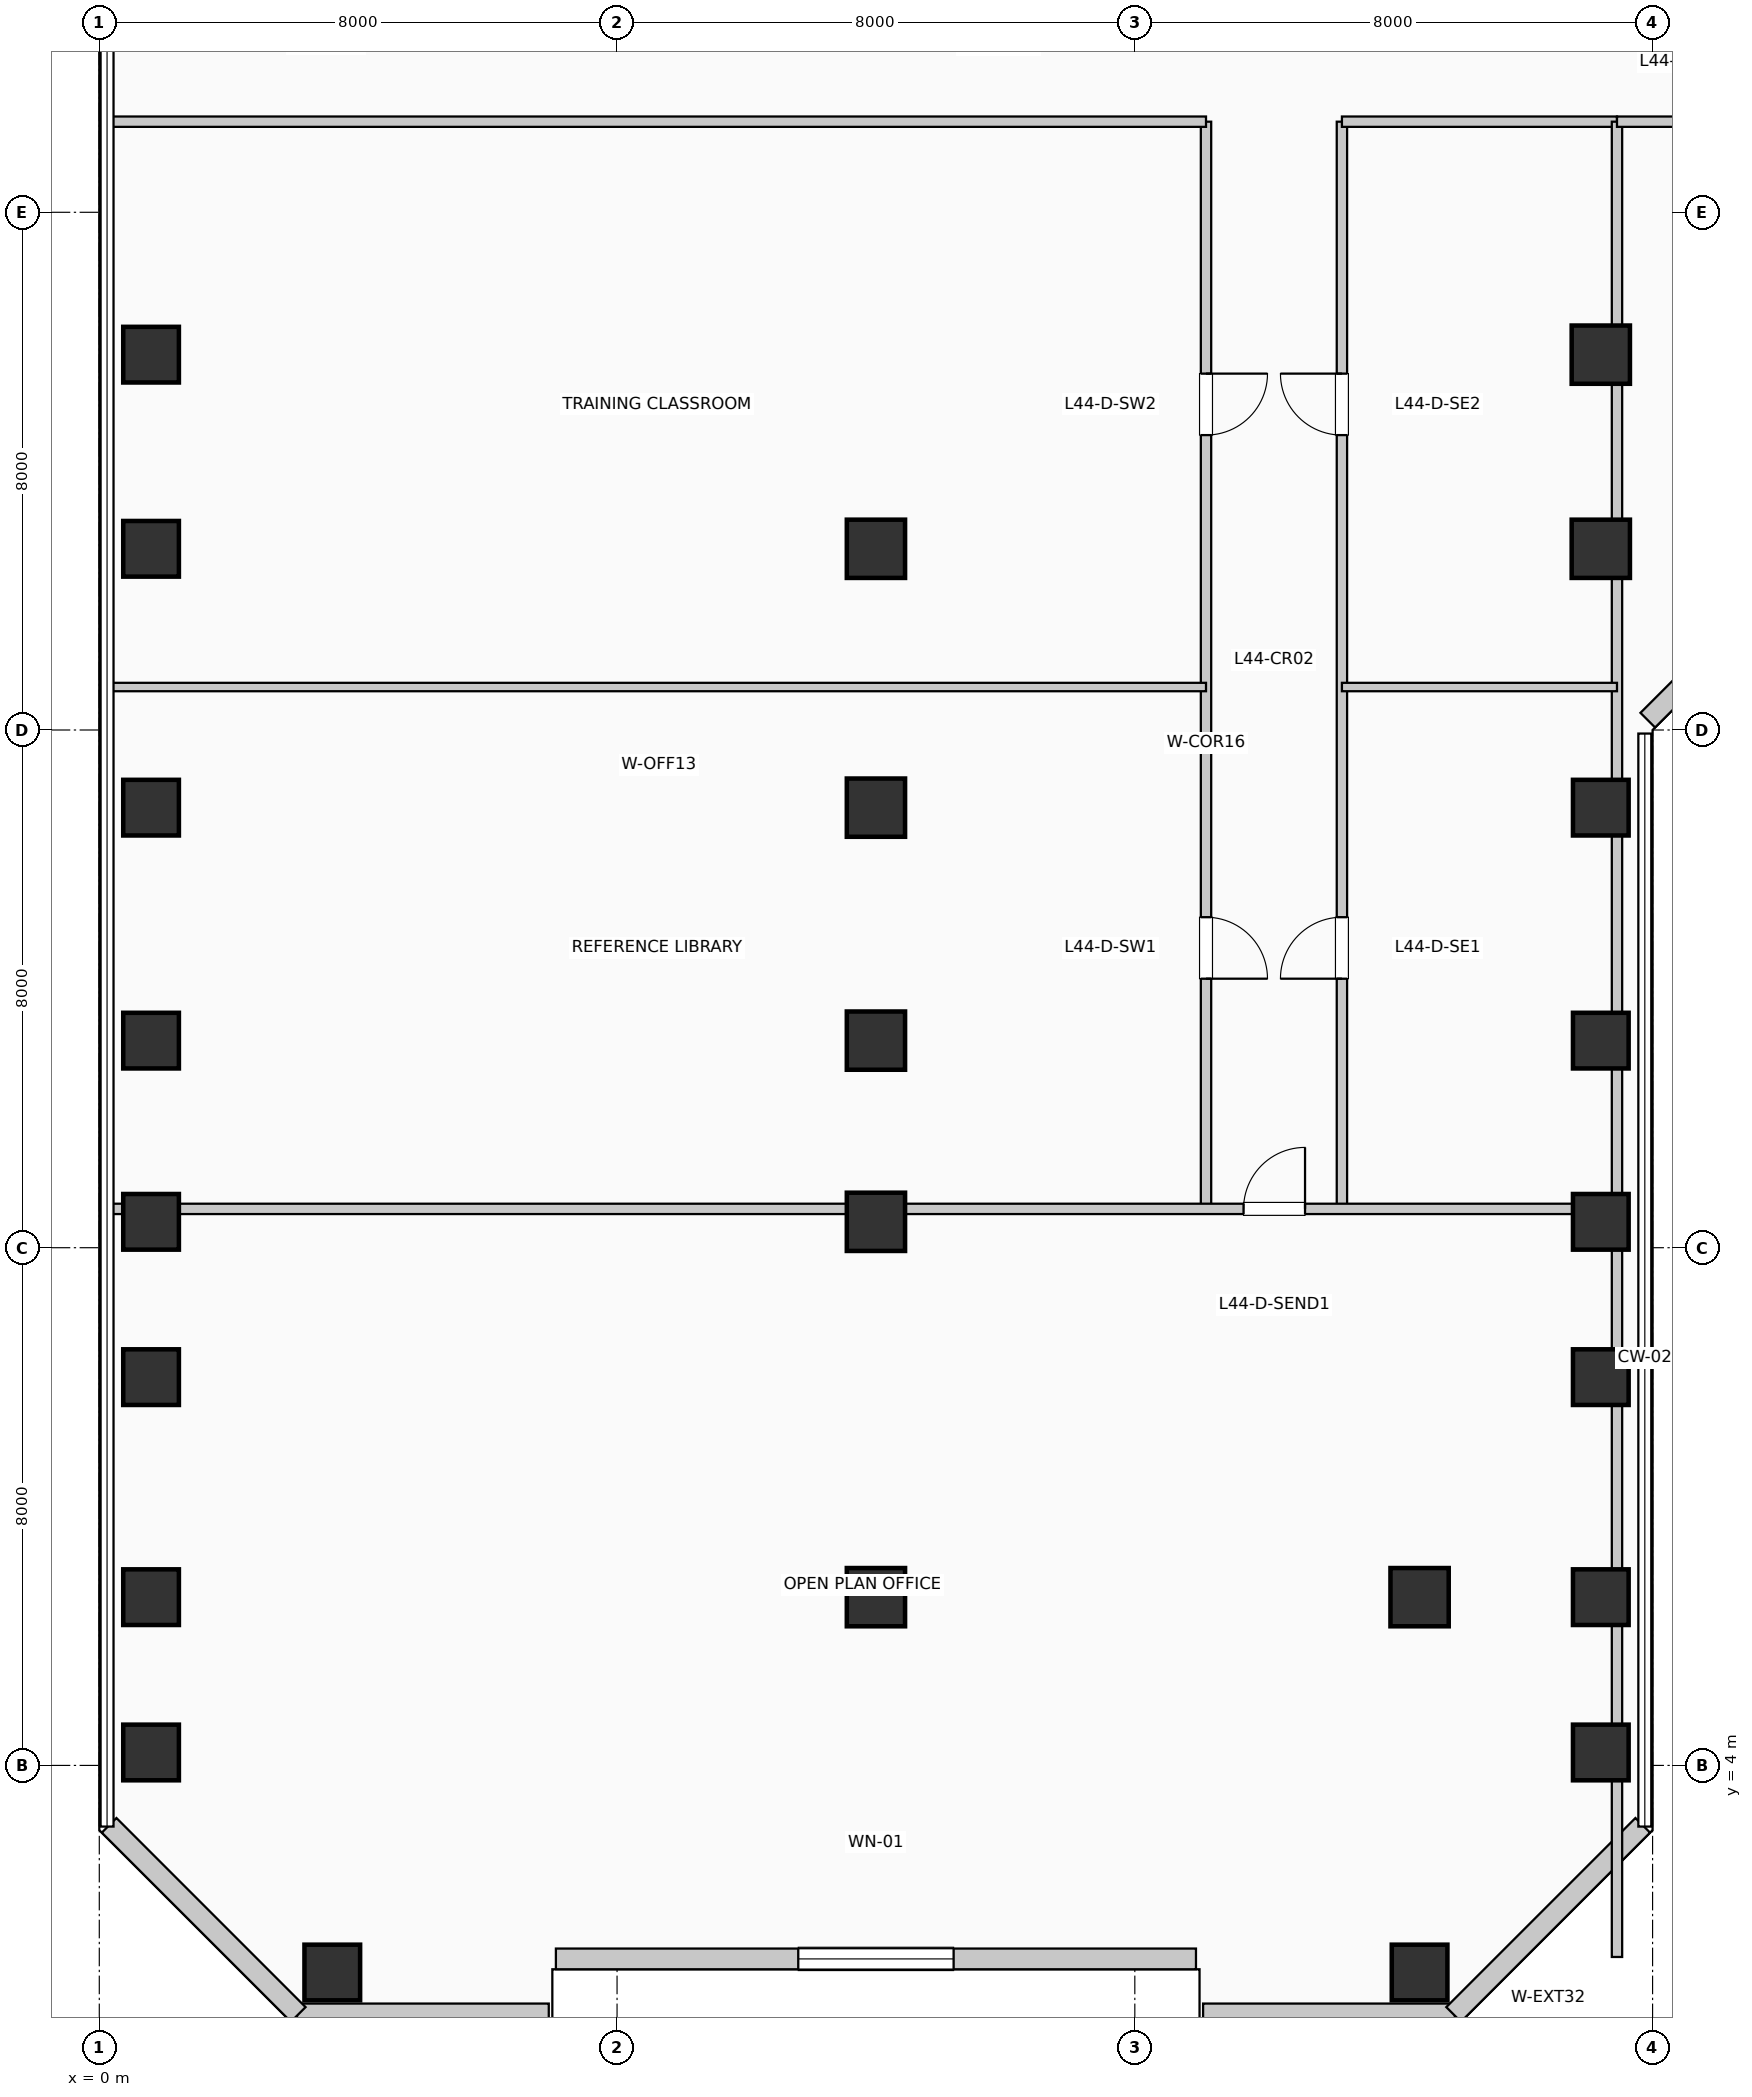
"""IFC4 building model, lengths in metres.
Left out: names, types, materials, properties, quantities, classifications, styles, units other than length and angle.
Written with IfcOpenShell. Run it as: python <this file> out.ifc"""

import sys

from ifc_helpers import new_model, si_unit, direction, frame, frame_2d, origin, origin_2d, place, context, subcontext, project, spatial, rectangle, extrude, element, fill, save


model = new_model("IFC4")
c1 = context("Model", 3, precision=1e-05, world=origin(), true_north=direction((0.0, 1.0)))
c2 = subcontext(c1, "Body", "Model", "MODEL_VIEW")
j1 = project(units=[si_unit("LENGTHUNIT", "METRE"), si_unit("PLANEANGLEUNIT", "RADIAN")], contexts=[c1])
p1 = place(None, origin())
s1 = spatial("IfcSite", under=j1, at=p1, CompositionType="ELEMENT")
p2 = place(p1, origin())
s2 = spatial("IfcBuilding", under=s1, at=p2, CompositionType="ELEMENT")
p3 = place(p2, frame((0.0, 0.0, 183.48)))
s3 = spatial("IfcBuildingStorey", under=s2, at=p3, CompositionType="ELEMENT", Elevation=183.48)
for number, where, z_axis, x_axis in (
    (1, (0.8, 4.2, 0.0), (0.0, 0.0, 1.0), (1.0, 0.0, 0.0)),
    (2, (0.8, 6.6, 0.0), (0.0, 0.0, 1.0), (1.0, 0.0, 0.0)),
    (3, (0.8, 10.0, 0.0), (0.0, 0.0, 1.0), (1.0, 0.0, 0.0)),
    (4, (0.8, 12.4, 0.0), (0.0, 0.0, 1.0), (1.0, 0.0, 0.0)),
    (5, (0.8, 15.2, 0.0), (0.0, 0.0, 1.0), (1.0, 0.0, 0.0)),
    (6, (0.8, 18.8, 0.0), (0.0, 0.0, 1.0), (1.0, 0.0, 0.0)),
    (7, (0.8, 22.8, 0.0), (0.0, 0.0, 1.0), (1.0, 0.0, 0.0)),
    (8, (0.8, 25.8, 0.0), (0.0, 0.0, 1.0), (1.0, 0.0, 0.0)),
    (9, (3.6, 0.8, 0.0), (0.0, 0.0, 1.0), (1.0, 0.0, 0.0)),
):
    element("IfcColumn", number, at=place(p3, frame(where, z_axis=z_axis, x_axis=x_axis)), inside=s3, PredefinedType="COLUMN", context=c2, shape_type="SweptSolid", body=[
        extrude(rectangle(XDim=0.86, YDim=0.86, at=origin_2d()), origin(), (0.0, 0.0, 1.0), 3.96),
    ])
for number, where, z_axis, x_axis in (
    (10, (12.0, 6.6, 0.0), (0.0, 0.0, 1.0), (1.0, 0.0, 0.0)),
    (11, (12.0, 12.4, 0.0), (0.0, 0.0, 1.0), (1.0, 0.0, 0.0)),
    (12, (12.0, 15.2, 0.0), (0.0, 0.0, 1.0), (1.0, 0.0, 0.0)),
    (13, (12.0, 18.8, 0.0), (0.0, 0.0, 1.0), (1.0, 0.0, 0.0)),
    (14, (12.0, 22.8, 0.0), (0.0, 0.0, 1.0), (1.0, 0.0, 0.0)),
):
    element("IfcColumn", number, at=place(p3, frame(where, z_axis=z_axis, x_axis=x_axis)), inside=s3, PredefinedType="COLUMN", context=c2, shape_type="SweptSolid", body=[
        extrude(rectangle(XDim=0.9, YDim=0.9, at=origin_2d()), origin(), (0.0, 0.0, 1.0), 3.96),
    ])
p4 = place(p3, frame((20.4, 0.8, 0.0), z_axis=(0.0, 0.0, 1.0), x_axis=(1.0, 0.0, 0.0)))
e15 = element("IfcColumn", 15, at=p4, inside=s3, PredefinedType="COLUMN", context=c2, shape_type="SweptSolid", body=[
    extrude(rectangle(XDim=0.86, YDim=0.86, at=origin_2d()), origin(), (0.0, 0.0, 1.0), 3.96),
])
p5 = place(p3, frame((20.4, 6.6, 0.0), z_axis=(0.0, 0.0, 1.0), x_axis=(1.0, 0.0, 0.0)))
e16 = element("IfcColumn", 16, at=p5, inside=s3, PredefinedType="COLUMN", context=c2, shape_type="SweptSolid", body=[
    extrude(rectangle(XDim=0.9, YDim=0.9, at=origin_2d()), origin(), (0.0, 0.0, 1.0), 3.96),
])
for number, where, z_axis, x_axis in (
    (17, (23.2, 4.2, 0.0), (0.0, 0.0, 1.0), (1.0, 0.0, 0.0)),
    (18, (23.2, 6.6, 0.0), (0.0, 0.0, 1.0), (1.0, 0.0, 0.0)),
    (19, (23.2, 10.0, 0.0), (0.0, 0.0, 1.0), (1.0, 0.0, 0.0)),
    (20, (23.2, 12.4, 0.0), (0.0, 0.0, 1.0), (1.0, 0.0, 0.0)),
    (21, (23.2, 15.2, 0.0), (0.0, 0.0, 1.0), (1.0, 0.0, 0.0)),
    (22, (23.2, 18.8, 0.0), (0.0, 0.0, 1.0), (1.0, 0.0, 0.0)),
):
    element("IfcColumn", number, at=place(p3, frame(where, z_axis=z_axis, x_axis=x_axis)), inside=s3, PredefinedType="COLUMN", context=c2, shape_type="SweptSolid", body=[
        extrude(rectangle(XDim=0.86, YDim=0.86, at=origin_2d()), origin(), (0.0, 0.0, 1.0), 3.96),
    ])
for number, where, z_axis, x_axis in (
    (23, (23.2, 22.8, 0.0), (0.0, 0.0, 1.0), (1.0, 0.0, 0.0)),
    (24, (23.2, 25.8, 0.0), (0.0, 0.0, 1.0), (1.0, 0.0, 0.0)),
):
    element("IfcColumn", number, at=place(p3, frame(where, z_axis=z_axis, x_axis=x_axis)), inside=s3, PredefinedType="COLUMN", context=c2, shape_type="SweptSolid", body=[
        extrude(rectangle(XDim=0.9, YDim=0.9, at=origin_2d()), origin(), (0.0, 0.0, 1.0), 3.96),
    ])
p6 = place(p3, frame((3.055, 0.16, 0.0), z_axis=(0.0, 0.0, 1.0), x_axis=(1.0, 0.0, 0.0)))
e25 = element("IfcWall", 25, at=p6, inside=s3, PredefinedType="SOLIDWALL", context=c2, shape_type="SweptSolid", body=[
    extrude(rectangle(XDim=3.89, YDim=0.32, at=frame_2d((1.945, 0.0))), origin(), (0.0, 0.0, 1.0), 3.71),
])
p7 = place(p3, frame((7.055, 1.01, 0.0), z_axis=(0.0, 0.0, 1.0), x_axis=(1.0, 0.0, 0.0)))
e26 = element("IfcWall", 26, at=p7, inside=s3, PredefinedType="SOLIDWALL", context=c2, shape_type="SweptSolid", body=[
    extrude(rectangle(XDim=9.89, YDim=0.32, at=frame_2d((4.945, 0.0))), origin(), (0.0, 0.0, 1.0), 3.71),
])
p8 = place(p7, frame((3.745, 0.0, 0.85)))
e27 = element("IfcOpeningElement", 27, at=p8, cuts=e26, PredefinedType="OPENING", context=c2, shape_type="SweptSolid", body=[
    extrude(rectangle(XDim=2.4, YDim=2.05, at=frame_2d((1.2, 1.025))), frame((0.0, 0.17, 0.0), z_axis=(0.0, -1.0, 0.0), x_axis=(1.0, 0.0, 0.0)), (0.0, 0.0, 1.0), 0.34),
])
p9 = place(p3, frame((17.055, 0.16, 0.0), z_axis=(0.0, 0.0, 1.0), x_axis=(1.0, 0.0, 0.0)))
e28 = element("IfcWall", 28, at=p9, inside=s3, PredefinedType="SOLIDWALL", context=c2, shape_type="SweptSolid", body=[
    extrude(rectangle(XDim=3.89, YDim=0.32, at=frame_2d((1.945, 0.0))), origin(), (0.0, 0.0, 1.0), 3.71),
])
p10 = place(p3, frame((20.926, 0.152, 0.0), z_axis=(0.0, 0.0, 1.0), x_axis=(0.707106781187, 0.707106781187, 0.0)))
e29 = element("IfcWall", 29, at=p10, inside=s3, PredefinedType="SOLIDWALL", context=c2, shape_type="SweptSolid", body=[
    extrude(rectangle(XDim=4.133, YDim=0.32, at=frame_2d((2.066, 0.0))), origin(), (0.0, 0.0, 1.0), 3.71),
])
p11 = place(p3, frame((23.926, 20.152, 0.0), z_axis=(0.0, 0.0, 1.0), x_axis=(0.707106781187, 0.707106781187, 0.0)))
e30 = element("IfcWall", 30, at=p11, inside=s3, PredefinedType="SOLIDWALL", context=c2, shape_type="SweptSolid", body=[
    extrude(rectangle(XDim=2.718, YDim=0.32, at=frame_2d((1.359, 0.0))), origin(), (0.0, 0.0, 1.0), 3.71),
])
p12 = place(p3, frame((0.152, 3.074, 0.0), z_axis=(0.0, 0.0, 1.0), x_axis=(0.707106781187, -0.707106781187, 0.0)))
e31 = element("IfcWall", 31, at=p12, inside=s3, PredefinedType="SOLIDWALL", context=c2, shape_type="SweptSolid", body=[
    extrude(rectangle(XDim=4.133, YDim=0.32, at=frame_2d((2.066, 0.0))), origin(), (0.0, 0.0, 1.0), 3.71),
])
p13 = place(p3, frame((17.1, 12.6, 0.0), z_axis=(0.0, 0.0, 1.0), x_axis=(0.0, 1.0, 0.0)))
e32 = element("IfcWall", 32, at=p13, inside=s3, PredefinedType="PARTITIONING", context=c2, shape_type="SweptSolid", body=[
    extrude(rectangle(XDim=16.8, YDim=0.16, at=frame_2d((8.4, 0.0))), origin(), (0.0, 0.0, 1.0), 3.71),
])
p14 = place(p13, frame((4.507, 0.0, 0.0), z_axis=(0.0, 0.0, 1.0), x_axis=(-1.0, 0.0, 0.0)))
e33 = element("IfcOpeningElement", 33, at=p14, cuts=e32, PredefinedType="OPENING", context=c2, shape_type="SweptSolid", body=[
    extrude(rectangle(XDim=0.95, YDim=2.15, at=frame_2d((0.475, 1.075))), frame((0.0, 0.09, 0.0), z_axis=(0.0, -1.0, 0.0), x_axis=(1.0, 0.0, 0.0)), (0.0, 0.0, 1.0), 0.18),
])
p15 = place(p13, frame((12.907, 0.0, 0.0), z_axis=(0.0, 0.0, 1.0), x_axis=(-1.0, 0.0, 0.0)))
e34 = element("IfcOpeningElement", 34, at=p15, cuts=e32, PredefinedType="OPENING", context=c2, shape_type="SweptSolid", body=[
    extrude(rectangle(XDim=0.95, YDim=2.15, at=frame_2d((0.475, 1.075))), frame((0.0, 0.09, 0.0), z_axis=(0.0, -1.0, 0.0), x_axis=(1.0, 0.0, 0.0)), (0.0, 0.0, 1.0), 0.18),
])
p16 = place(p3, frame((19.2, 12.6, 0.0), z_axis=(0.0, 0.0, 1.0), x_axis=(0.0, 1.0, 0.0)))
e35 = element("IfcWall", 35, at=p16, inside=s3, PredefinedType="PARTITIONING", context=c2, shape_type="SweptSolid", body=[
    extrude(rectangle(XDim=16.8, YDim=0.16, at=frame_2d((8.4, 0.0))), origin(), (0.0, 0.0, 1.0), 3.71),
])
p17 = place(p16, frame((3.557, 0.0, 0.0)))
e36 = element("IfcOpeningElement", 36, at=p17, cuts=e35, PredefinedType="OPENING", context=c2, shape_type="SweptSolid", body=[
    extrude(rectangle(XDim=0.95, YDim=2.15, at=frame_2d((0.475, 1.075))), frame((0.0, 0.09, 0.0), z_axis=(0.0, -1.0, 0.0), x_axis=(1.0, 0.0, 0.0)), (0.0, 0.0, 1.0), 0.18),
])
p18 = place(p16, frame((11.957, 0.0, 0.0)))
e37 = element("IfcOpeningElement", 37, at=p18, cuts=e35, PredefinedType="OPENING", context=c2, shape_type="SweptSolid", body=[
    extrude(rectangle(XDim=0.95, YDim=2.15, at=frame_2d((0.475, 1.075))), frame((0.0, 0.09, 0.0), z_axis=(0.0, -1.0, 0.0), x_axis=(1.0, 0.0, 0.0)), (0.0, 0.0, 1.0), 0.18),
])
p19 = place(p3, frame((0.19, 12.6, 0.0), z_axis=(0.0, 0.0, 1.0), x_axis=(1.0, 0.0, 0.0)))
e38 = element("IfcWall", 38, at=p19, inside=s3, PredefinedType="PARTITIONING", context=c2, shape_type="SweptSolid", body=[
    extrude(rectangle(XDim=23.26, YDim=0.16, at=frame_2d((11.63, 0.0))), origin(), (0.0, 0.0, 1.0), 3.045),
])
p20 = place(p19, frame((17.49, 0.0, 0.0)))
e39 = element("IfcOpeningElement", 39, at=p20, cuts=e38, PredefinedType="OPENING", context=c2, shape_type="SweptSolid", body=[
    extrude(rectangle(XDim=0.95, YDim=2.15, at=frame_2d((0.475, 1.075))), frame((0.0, 0.09, 0.0), z_axis=(0.0, -1.0, 0.0), x_axis=(1.0, 0.0, 0.0)), (0.0, 0.0, 1.0), 0.18),
])
p21 = place(p3, frame((0.19, 29.4, 0.0), z_axis=(0.0, 0.0, 1.0), x_axis=(1.0, 0.0, 0.0)))
e40 = element("IfcWall", 40, at=p21, inside=s3, PredefinedType="PARTITIONING", context=c2, shape_type="SweptSolid", body=[
    extrude(rectangle(XDim=16.91, YDim=0.16, at=frame_2d((8.455, 0.0))), origin(), (0.0, 0.0, 1.0), 3.365),
])
p22 = place(p3, frame((19.2, 29.4, 0.0), z_axis=(0.0, 0.0, 1.0), x_axis=(1.0, 0.0, 0.0)))
e41 = element("IfcWall", 41, at=p22, inside=s3, PredefinedType="PARTITIONING", context=c2, shape_type="SweptSolid", body=[
    extrude(rectangle(XDim=4.25, YDim=0.16, at=frame_2d((2.125, 0.0))), origin(), (0.0, 0.0, 1.0), 3.71),
])
p23 = place(p3, frame((23.45, 1.04, 0.0), z_axis=(0.0, 0.0, 1.0), x_axis=(0.0, 1.0, 0.0)))
e42 = element("IfcWall", 42, at=p23, inside=s3, PredefinedType="PARTITIONING", context=c2, shape_type="SweptSolid", body=[
    extrude(rectangle(XDim=28.36, YDim=0.16, at=frame_2d((14.18, 0.0))), origin(), (0.0, 0.0, 1.0), 3.045),
])
p24 = place(p3, frame((0.19, 20.664, 0.0), z_axis=(0.0, 0.0, 1.0), x_axis=(1.0, 0.0, 0.0)))
e43 = element("IfcWall", 43, at=p24, inside=s3, PredefinedType="PARTITIONING", context=c2, shape_type="SweptSolid", body=[
    extrude(rectangle(XDim=16.91, YDim=0.13, at=frame_2d((8.455, 0.0))), origin(), (0.0, 0.0, 1.0), 3.71),
])
p25 = place(p3, frame((19.2, 20.664, 0.0), z_axis=(0.0, 0.0, 1.0), x_axis=(1.0, 0.0, 0.0)))
e44 = element("IfcWall", 44, at=p25, inside=s3, PredefinedType="PARTITIONING", context=c2, shape_type="SweptSolid", body=[
    extrude(rectangle(XDim=4.25, YDim=0.13, at=frame_2d((2.125, 0.0))), origin(), (0.0, 0.0, 1.0), 3.71),
])
p26 = place(p3, frame((23.45, 29.4, 0.0), z_axis=(0.0, 0.0, 1.0), x_axis=(1.0, 0.0, 0.0)))
e45 = element("IfcWall", 45, at=p26, inside=s3, PredefinedType="PARTITIONING", context=c2, shape_type="SweptSolid", body=[
    extrude(rectangle(XDim=4.15, YDim=0.16, at=frame_2d((2.075, 0.0))), origin(), (0.0, 0.0, 1.0), 3.365),
])
p27 = place(p8, origin())
e46 = element("IfcWindow", 46, at=p27, inside=s3, PartitioningType="SINGLE_PANEL", PredefinedType="WINDOW", context=c2, shape_type="SweptSolid", body=[
    extrude(rectangle(XDim=2.4, YDim=2.05, at=frame_2d((1.2, 1.025))), frame((0.0, 0.03, 0.0), z_axis=(0.0, -1.0, 0.0), x_axis=(1.0, 0.0, 0.0)), (0.0, 0.0, 1.0), 0.06),
])
fill(e27, e46)
p28 = place(p20, origin())
e47 = element("IfcDoor", 47, at=p28, inside=s3, OperationType="SINGLE_SWING_RIGHT", PredefinedType="DOOR", context=c2, shape_type="SweptSolid", body=[
    extrude(rectangle(XDim=0.95, YDim=2.15, at=frame_2d((0.475, 1.075))), frame((0.0, 0.025, 0.0), z_axis=(0.0, -1.0, 0.0), x_axis=(1.0, 0.0, 0.0)), (0.0, 0.0, 1.0), 0.05),
])
fill(e39, e47)
p29 = place(p14, origin())
e48 = element("IfcDoor", 48, at=p29, inside=s3, OperationType="SINGLE_SWING_LEFT", PredefinedType="DOOR", context=c2, shape_type="SweptSolid", body=[
    extrude(rectangle(XDim=0.95, YDim=2.15, at=frame_2d((0.475, 1.075))), frame((0.0, 0.025, 0.0), z_axis=(0.0, -1.0, 0.0), x_axis=(1.0, 0.0, 0.0)), (0.0, 0.0, 1.0), 0.05),
])
fill(e33, e48)
p30 = place(p15, origin())
e49 = element("IfcDoor", 49, at=p30, inside=s3, OperationType="SINGLE_SWING_RIGHT", PredefinedType="DOOR", context=c2, shape_type="SweptSolid", body=[
    extrude(rectangle(XDim=0.95, YDim=2.15, at=frame_2d((0.475, 1.075))), frame((0.0, 0.025, 0.0), z_axis=(0.0, -1.0, 0.0), x_axis=(1.0, 0.0, 0.0)), (0.0, 0.0, 1.0), 0.05),
])
fill(e34, e49)
p31 = place(p17, origin())
e50 = element("IfcDoor", 50, at=p31, inside=s3, OperationType="SINGLE_SWING_LEFT", PredefinedType="DOOR", context=c2, shape_type="SweptSolid", body=[
    extrude(rectangle(XDim=0.95, YDim=2.15, at=frame_2d((0.475, 1.075))), frame((0.0, 0.025, 0.0), z_axis=(0.0, -1.0, 0.0), x_axis=(1.0, 0.0, 0.0)), (0.0, 0.0, 1.0), 0.05),
])
fill(e36, e50)
p32 = place(p18, origin())
e51 = element("IfcDoor", 51, at=p32, inside=s3, OperationType="SINGLE_SWING_RIGHT", PredefinedType="DOOR", context=c2, shape_type="SweptSolid", body=[
    extrude(rectangle(XDim=0.95, YDim=2.15, at=frame_2d((0.475, 1.075))), frame((0.0, 0.025, 0.0), z_axis=(0.0, -1.0, 0.0), x_axis=(1.0, 0.0, 0.0)), (0.0, 0.0, 1.0), 0.05),
])
fill(e37, e51)
save(model, sys.argv[1])
